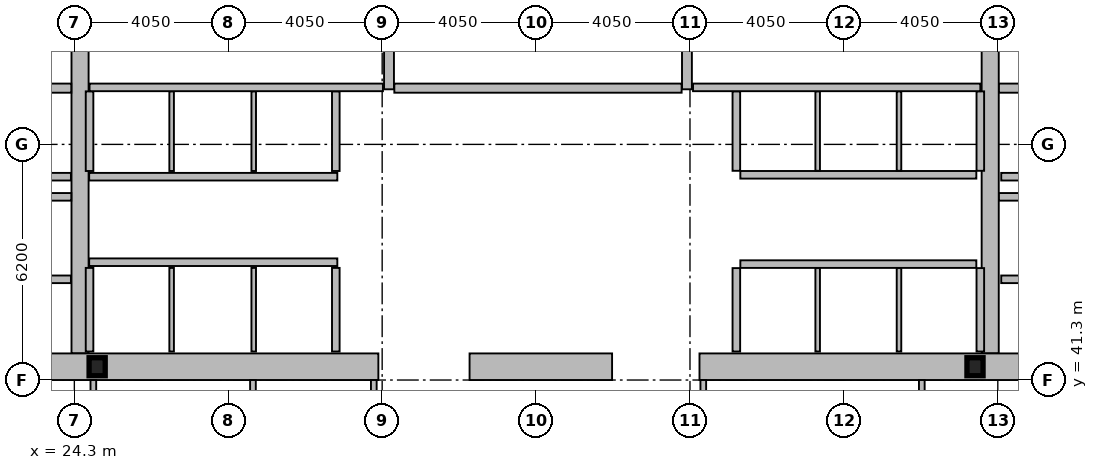
"""IFC4 building model, lengths in metres.
Left out: names, types, materials, properties, quantities, classifications, styles, units other than length and angle.
Written with IfcOpenShell. Run it as: python <this file> out.ifc"""

import sys

from ifc_helpers import new_model, si_unit, direction, frame, frame_2d, origin, origin_2d, place, context, subcontext, project, spatial, rectangle, i_section, extrude, element, fill, save


model = new_model("IFC4")
c1 = context("Model", 3, precision=1e-05, world=origin(), true_north=direction((0.0, 1.0)))
c2 = subcontext(c1, "Body", "Model", "MODEL_VIEW")
j1 = project(units=[si_unit("LENGTHUNIT", "METRE"), si_unit("PLANEANGLEUNIT", "RADIAN")], contexts=[c1])
p1 = place(None, origin())
s1 = spatial("IfcSite", under=j1, at=p1, CompositionType="ELEMENT")
p2 = place(p1, origin())
s2 = spatial("IfcBuilding", under=s1, at=p2, CompositionType="ELEMENT")
p3 = place(p2, frame((0.0, 0.0, 106.6)))
s3 = spatial("IfcBuildingStorey", under=s2, at=p3, CompositionType="ELEMENT", Elevation=106.6)
for number, where, z_axis, x_axis in (
    (1, (24.45, 42.0, 0.0), (0.0, 0.0, 1.0), (0.0, 1.0, 0.0)),
    (2, (48.4, 42.0, 0.0), (0.0, 0.0, 1.0), (0.0, 1.0, 0.0)),
):
    element("IfcWall", number, at=place(p3, frame(where, z_axis=z_axis, x_axis=x_axis)), inside=s3, PredefinedType="SHEAR", context=c2, shape_type="SweptSolid", body=[
        extrude(rectangle(XDim=11.0, YDim=0.45, at=frame_2d((5.5, 0.0))), origin(), (0.0, 0.0, 1.0), 4.24),
    ])
p4 = place(p3, frame((32.3, 41.65, 0.0), z_axis=(0.0, 0.0, 1.0), x_axis=(-1.0, 0.0, 0.0)))
e3 = element("IfcWall", 3, at=p4, inside=s3, PredefinedType="SHEAR", context=c2, shape_type="SweptSolid", body=[
    extrude(rectangle(XDim=11.45, YDim=0.7, at=frame_2d((5.725, 0.0))), origin(), (0.0, 0.0, 1.0), 4.24),
])
p5 = place(p3, frame((38.45, 41.65, 0.0), z_axis=(0.0, 0.0, 1.0), x_axis=(-1.0, 0.0, 0.0)))
e4 = element("IfcWall", 4, at=p5, inside=s3, PredefinedType="SHEAR", context=c2, shape_type="SweptSolid", body=[
    extrude(rectangle(XDim=3.75, YDim=0.7, at=frame_2d((1.875, 0.0))), origin(), (0.0, 0.0, 1.0), 4.24),
])
p6 = place(p3, frame((52.05, 41.65, 0.0), z_axis=(0.0, 0.0, 1.0), x_axis=(-1.0, 0.0, 0.0)))
e5 = element("IfcWall", 5, at=p6, inside=s3, PredefinedType="SHEAR", context=c2, shape_type="SweptSolid", body=[
    extrude(rectangle(XDim=11.3, YDim=0.7, at=frame_2d((5.65, 0.0))), origin(), (0.0, 0.0, 1.0), 4.24),
])
for number, where, z_axis, x_axis in (
    (6, (32.58, 48.95, 0.0), (0.0, 0.0, 1.0), (0.0, 1.0, 0.0)),
    (7, (40.42, 48.95, 0.0), (0.0, 0.0, 1.0), (0.0, 1.0, 0.0)),
):
    element("IfcWall", number, at=place(p3, frame(where, z_axis=z_axis, x_axis=x_axis)), inside=s3, PredefinedType="SHEAR", context=c2, shape_type="SweptSolid", body=[
        extrude(rectangle(XDim=4.05, YDim=0.26, at=frame_2d((2.025, 0.0))), origin(), (0.0, 0.0, 1.0), 4.24),
    ])
p7 = place(p3, frame((16.9, 48.98, 0.0), z_axis=(0.0, 0.0, 1.0), x_axis=(1.0, 0.0, 0.0)))
e8 = element("IfcWall", 8, at=p7, inside=s3, PredefinedType="SHEAR", context=c2, shape_type="SweptSolid", body=[
    extrude(rectangle(XDim=7.32, YDim=0.24, at=frame_2d((3.66, 0.0))), origin(), (0.0, 0.0, 1.0), 4.24),
])
p8 = place(p7, frame((0.22, 0.0, 0.0)))
e9 = element("IfcOpeningElement", 9, at=p8, cuts=e8, PredefinedType="OPENING", context=c2, shape_type="SweptSolid", body=[
    extrude(rectangle(XDim=1.05, YDim=2.15, at=frame_2d((0.525, 1.075))), frame((0.0, 0.13, 0.0), z_axis=(0.0, -1.0, 0.0), x_axis=(1.0, 0.0, 0.0)), (0.0, 0.0, 1.0), 0.26),
])
p9 = place(p3, frame((48.63, 48.98, 0.0), z_axis=(0.0, 0.0, 1.0), x_axis=(1.0, 0.0, 0.0)))
e10 = element("IfcWall", 10, at=p9, inside=s3, PredefinedType="SHEAR", context=c2, shape_type="SweptSolid", body=[
    extrude(rectangle(XDim=7.37, YDim=0.24, at=frame_2d((3.685, 0.0))), origin(), (0.0, 0.0, 1.0), 4.24),
])
p10 = place(p9, frame((6.1, 0.0, 0.0)))
e11 = element("IfcOpeningElement", 11, at=p10, cuts=e10, PredefinedType="OPENING", context=c2, shape_type="SweptSolid", body=[
    extrude(rectangle(XDim=1.05, YDim=2.15, at=frame_2d((0.525, 1.075))), frame((0.0, 0.13, 0.0), z_axis=(0.0, -1.0, 0.0), x_axis=(1.0, 0.0, 0.0)), (0.0, 0.0, 1.0), 0.26),
])
p11 = place(p3, frame((32.72, 48.98, 0.0), z_axis=(0.0, 0.0, 1.0), x_axis=(1.0, 0.0, 0.0)))
e12 = element("IfcWall", 12, at=p11, inside=s3, PredefinedType="SHEAR", context=c2, shape_type="SweptSolid", body=[
    extrude(rectangle(XDim=7.56, YDim=0.24, at=frame_2d((3.78, 0.0))), origin(), (0.0, 0.0, 1.0), 4.24),
])
p12 = place(p11, frame((0.22, 0.0, 0.0)))
e13 = element("IfcOpeningElement", 13, at=p12, cuts=e12, PredefinedType="OPENING", context=c2, shape_type="SweptSolid", body=[
    extrude(rectangle(XDim=1.05, YDim=2.15, at=frame_2d((0.525, 1.075))), frame((0.0, 0.13, 0.0), z_axis=(0.0, -1.0, 0.0), x_axis=(1.0, 0.0, 0.0)), (0.0, 0.0, 1.0), 0.26),
])
for number, where, z_axis, x_axis in (
    (14, (24.9, 41.65, 0.0), (0.0, 0.0, 1.0), (1.0, 0.0, 0.0)),
    (15, (48.0, 41.65, 0.0), (0.0, 0.0, 1.0), (1.0, 0.0, 0.0)),
):
    element("IfcColumn", number, at=place(p3, frame(where, z_axis=z_axis, x_axis=x_axis)), inside=s3, PredefinedType="COLUMN", context=c2, shape_type="SweptSolid", body=[
        extrude(i_section(OverallWidth=0.424, OverallDepth=0.474, WebThickness=0.048, FlangeThickness=0.077, at=origin_2d()), origin(), (0.0, 0.0, 1.0), 4.4),
    ])
p13 = place(p3, frame((24.69, 44.4, 0.0), z_axis=(0.0, 0.0, 1.0), x_axis=(1.0, 0.0, 0.0)))
e16 = element("IfcWall", 16, at=p13, inside=s3, PredefinedType="PARTITIONING", context=c2, shape_type="SweptSolid", body=[
    extrude(rectangle(XDim=6.53, YDim=0.2, at=frame_2d((3.265, 0.0))), origin(), (0.0, 0.0, 1.0), 4.24),
])
p14 = place(p13, frame((0.53, 0.0, 0.0)))
e17 = element("IfcOpeningElement", 17, at=p14, cuts=e16, PredefinedType="OPENING", context=c2, shape_type="SweptSolid", body=[
    extrude(rectangle(XDim=1.1, YDim=2.18, at=frame_2d((0.55, 1.09))), frame((0.0, 0.11, 0.0), z_axis=(0.0, -1.0, 0.0), x_axis=(1.0, 0.0, 0.0)), (0.0, 0.0, 1.0), 0.22),
])
p15 = place(p13, frame((2.69, 0.0, 0.0)))
e18 = element("IfcOpeningElement", 18, at=p15, cuts=e16, PredefinedType="OPENING", context=c2, shape_type="SweptSolid", body=[
    extrude(rectangle(XDim=1.1, YDim=2.18, at=frame_2d((0.55, 1.09))), frame((0.0, 0.11, 0.0), z_axis=(0.0, -1.0, 0.0), x_axis=(1.0, 0.0, 0.0)), (0.0, 0.0, 1.0), 0.22),
])
p16 = place(p13, frame((4.85, 0.0, 0.0)))
e19 = element("IfcOpeningElement", 19, at=p16, cuts=e16, PredefinedType="OPENING", context=c2, shape_type="SweptSolid", body=[
    extrude(rectangle(XDim=1.1, YDim=2.18, at=frame_2d((0.55, 1.09))), frame((0.0, 0.11, 0.0), z_axis=(0.0, -1.0, 0.0), x_axis=(1.0, 0.0, 0.0)), (0.0, 0.0, 1.0), 0.22),
])
p17 = place(p3, frame((51.61, 43.95, 0.0), z_axis=(0.0, 0.0, 1.0), x_axis=(-1.0, 0.0, 0.0)))
e20 = element("IfcWall", 20, at=p17, inside=s3, PredefinedType="PARTITIONING", context=c2, shape_type="SweptSolid", body=[
    extrude(rectangle(XDim=2.92, YDim=0.2, at=frame_2d((1.46, 0.0))), origin(), (0.0, 0.0, 1.0), 4.24),
])
p18 = place(p17, frame((0.81, 0.0, 0.0)))
e21 = element("IfcOpeningElement", 21, at=p18, cuts=e20, PredefinedType="OPENING", context=c2, shape_type="SweptSolid", body=[
    extrude(rectangle(XDim=1.3, YDim=2.18, at=frame_2d((0.65, 1.09))), frame((0.0, 0.11, 0.0), z_axis=(0.0, -1.0, 0.0), x_axis=(1.0, 0.0, 0.0)), (0.0, 0.0, 1.0), 0.22),
])
p19 = place(p3, frame((24.21, 43.95, 0.0), z_axis=(0.0, 0.0, 1.0), x_axis=(-1.0, 0.0, 0.0)))
e22 = element("IfcWall", 22, at=p19, inside=s3, PredefinedType="PARTITIONING", context=c2, shape_type="SweptSolid", body=[
    extrude(rectangle(XDim=2.97, YDim=0.2, at=frame_2d((1.485, 0.0))), origin(), (0.0, 0.0, 1.0), 4.24),
])
p20 = place(p19, frame((0.86, 0.0, 0.0)))
e23 = element("IfcOpeningElement", 23, at=p20, cuts=e22, PredefinedType="OPENING", context=c2, shape_type="SweptSolid", body=[
    extrude(rectangle(XDim=1.3, YDim=2.18, at=frame_2d((0.65, 1.09))), frame((0.0, 0.11, 0.0), z_axis=(0.0, -1.0, 0.0), x_axis=(1.0, 0.0, 0.0)), (0.0, 0.0, 1.0), 0.22),
])
p21 = place(p3, frame((51.61, 46.65, 0.0), z_axis=(0.0, 0.0, 1.0), x_axis=(-1.0, 0.0, 0.0)))
e24 = element("IfcWall", 24, at=p21, inside=s3, PredefinedType="PARTITIONING", context=c2, shape_type="SweptSolid", body=[
    extrude(rectangle(XDim=2.92, YDim=0.2, at=frame_2d((1.46, 0.0))), origin(), (0.0, 0.0, 1.0), 4.24),
])
p22 = place(p21, frame((0.86, 0.0, 0.0)))
e25 = element("IfcOpeningElement", 25, at=p22, cuts=e24, PredefinedType="OPENING", context=c2, shape_type="SweptSolid", body=[
    extrude(rectangle(XDim=1.2, YDim=2.18, at=frame_2d((0.6, 1.09))), frame((0.0, 0.11, 0.0), z_axis=(0.0, -1.0, 0.0), x_axis=(1.0, 0.0, 0.0)), (0.0, 0.0, 1.0), 0.22),
])
p23 = place(p3, frame((24.21, 46.65, 0.0), z_axis=(0.0, 0.0, 1.0), x_axis=(-1.0, 0.0, 0.0)))
e26 = element("IfcWall", 26, at=p23, inside=s3, PredefinedType="PARTITIONING", context=c2, shape_type="SweptSolid", body=[
    extrude(rectangle(XDim=2.97, YDim=0.2, at=frame_2d((1.485, 0.0))), origin(), (0.0, 0.0, 1.0), 4.24),
])
p24 = place(p23, frame((0.91, 0.0, 0.0)))
e27 = element("IfcOpeningElement", 27, at=p24, cuts=e26, PredefinedType="OPENING", context=c2, shape_type="SweptSolid", body=[
    extrude(rectangle(XDim=1.2, YDim=2.18, at=frame_2d((0.6, 1.09))), frame((0.0, 0.11, 0.0), z_axis=(0.0, -1.0, 0.0), x_axis=(1.0, 0.0, 0.0)), (0.0, 0.0, 1.0), 0.22),
])
p25 = place(p3, frame((31.22, 46.65, 0.0), z_axis=(0.0, 0.0, 1.0), x_axis=(-1.0, 0.0, 0.0)))
e28 = element("IfcWall", 28, at=p25, inside=s3, PredefinedType="PARTITIONING", context=c2, shape_type="SweptSolid", body=[
    extrude(rectangle(XDim=6.53, YDim=0.2, at=frame_2d((3.265, 0.0))), origin(), (0.0, 0.0, 1.0), 4.24),
])
p26 = place(p25, frame((4.9, 0.0, 0.0)))
e29 = element("IfcOpeningElement", 29, at=p26, cuts=e28, PredefinedType="OPENING", context=c2, shape_type="SweptSolid", body=[
    extrude(rectangle(XDim=1.1, YDim=2.18, at=frame_2d((0.55, 1.09))), frame((0.0, 0.11, 0.0), z_axis=(0.0, -1.0, 0.0), x_axis=(1.0, 0.0, 0.0)), (0.0, 0.0, 1.0), 0.22),
])
p27 = place(p25, frame((2.74, 0.0, 0.0)))
e30 = element("IfcOpeningElement", 30, at=p27, cuts=e28, PredefinedType="OPENING", context=c2, shape_type="SweptSolid", body=[
    extrude(rectangle(XDim=1.1, YDim=2.18, at=frame_2d((0.55, 1.09))), frame((0.0, 0.11, 0.0), z_axis=(0.0, -1.0, 0.0), x_axis=(1.0, 0.0, 0.0)), (0.0, 0.0, 1.0), 0.22),
])
p28 = place(p25, frame((0.58, 0.0, 0.0)))
e31 = element("IfcOpeningElement", 31, at=p28, cuts=e28, PredefinedType="OPENING", context=c2, shape_type="SweptSolid", body=[
    extrude(rectangle(XDim=1.1, YDim=2.18, at=frame_2d((0.55, 1.09))), frame((0.0, 0.11, 0.0), z_axis=(0.0, -1.0, 0.0), x_axis=(1.0, 0.0, 0.0)), (0.0, 0.0, 1.0), 0.22),
])
p29 = place(p3, frame((21.2, 46.12, 0.0), z_axis=(0.0, 0.0, 1.0), x_axis=(1.0, 0.0, 0.0)))
e32 = element("IfcWall", 32, at=p29, inside=s3, PredefinedType="PARTITIONING", context=c2, shape_type="SweptSolid", body=[
    extrude(rectangle(XDim=3.02, YDim=0.2, at=frame_2d((1.51, 0.0))), origin(), (0.0, 0.0, 1.0), 4.24),
])
p30 = place(p3, frame((48.63, 46.12, 0.0), z_axis=(0.0, 0.0, 1.0), x_axis=(1.0, 0.0, 0.0)))
e33 = element("IfcWall", 33, at=p30, inside=s3, PredefinedType="PARTITIONING", context=c2, shape_type="SweptSolid", body=[
    extrude(rectangle(XDim=3.07, YDim=0.2, at=frame_2d((1.535, 0.0))), origin(), (0.0, 0.0, 1.0), 4.24),
])
for number, where, z_axis, x_axis in (
    (34, (24.7, 46.8, 0.0), (0.0, 0.0, 1.0), (0.0, 1.0, 0.0)),
    (35, (31.18, 46.8, 0.0), (0.0, 0.0, 1.0), (0.0, 1.0, 0.0)),
):
    element("IfcWall", number, at=place(p3, frame(where, z_axis=z_axis, x_axis=x_axis)), inside=s3, PredefinedType="PARTITIONING", context=c2, shape_type="SweptSolid", body=[
        extrude(rectangle(XDim=2.095, YDim=0.2, at=frame_2d((1.047, 0.0))), origin(), (0.0, 0.0, 1.0), 4.24),
    ])
for number, where, z_axis, x_axis in (
    (36, (26.86, 46.8, 0.0), (0.0, 0.0, 1.0), (0.0, 1.0, 0.0)),
    (37, (29.02, 46.8, 0.0), (0.0, 0.0, 1.0), (0.0, 1.0, 0.0)),
):
    element("IfcWall", number, at=place(p3, frame(where, z_axis=z_axis, x_axis=x_axis)), inside=s3, PredefinedType="PARTITIONING", context=c2, shape_type="SweptSolid", body=[
        extrude(rectangle(XDim=2.095, YDim=0.12, at=frame_2d((1.047, 0.0))), origin(), (0.0, 0.0, 1.0), 4.24),
    ])
for number, where, z_axis, x_axis in (
    (38, (24.7, 42.05, 0.0), (0.0, 0.0, 1.0), (0.0, 1.0, 0.0)),
    (39, (31.18, 42.05, 0.0), (0.0, 0.0, 1.0), (0.0, 1.0, 0.0)),
):
    element("IfcWall", number, at=place(p3, frame(where, z_axis=z_axis, x_axis=x_axis)), inside=s3, PredefinedType="PARTITIONING", context=c2, shape_type="SweptSolid", body=[
        extrude(rectangle(XDim=2.2, YDim=0.2, at=frame_2d((1.1, 0.0))), origin(), (0.0, 0.0, 1.0), 4.24),
    ])
for number, where, z_axis, x_axis in (
    (40, (26.86, 42.05, 0.0), (0.0, 0.0, 1.0), (0.0, 1.0, 0.0)),
    (41, (29.02, 42.05, 0.0), (0.0, 0.0, 1.0), (0.0, 1.0, 0.0)),
):
    element("IfcWall", number, at=place(p3, frame(where, z_axis=z_axis, x_axis=x_axis)), inside=s3, PredefinedType="PARTITIONING", context=c2, shape_type="SweptSolid", body=[
        extrude(rectangle(XDim=2.2, YDim=0.12, at=frame_2d((1.1, 0.0))), origin(), (0.0, 0.0, 1.0), 4.24),
    ])
p31 = place(p3, frame((41.825, 46.7, 0.0), z_axis=(0.0, 0.0, 1.0), x_axis=(1.0, 0.0, 0.0)))
e42 = element("IfcWall", 42, at=p31, inside=s3, PredefinedType="PARTITIONING", context=c2, shape_type="SweptSolid", body=[
    extrude(rectangle(XDim=6.21, YDim=0.2, at=frame_2d((3.105, 0.0))), origin(), (0.0, 0.0, 1.0), 4.24),
])
for number, where, z_axis, x_axis in (
    (43, (41.72, 46.805, 0.0), (0.0, 0.0, 1.0), (0.0, 1.0, 0.0)),
    (44, (48.14, 46.805, 0.0), (0.0, 0.0, 1.0), (0.0, 1.0, 0.0)),
):
    element("IfcWall", number, at=place(p3, frame(where, z_axis=z_axis, x_axis=x_axis)), inside=s3, PredefinedType="PARTITIONING", context=c2, shape_type="SweptSolid", body=[
        extrude(rectangle(XDim=2.09, YDim=0.2, at=frame_2d((1.045, 0.0))), origin(), (0.0, 0.0, 1.0), 4.24),
    ])
for number, where, z_axis, x_axis in (
    (45, (43.86, 46.805, 0.0), (0.0, 0.0, 1.0), (0.0, 1.0, 0.0)),
    (46, (46.0, 46.805, 0.0), (0.0, 0.0, 1.0), (0.0, 1.0, 0.0)),
):
    element("IfcWall", number, at=place(p3, frame(where, z_axis=z_axis, x_axis=x_axis)), inside=s3, PredefinedType="PARTITIONING", context=c2, shape_type="SweptSolid", body=[
        extrude(rectangle(XDim=2.09, YDim=0.12, at=frame_2d((1.045, 0.0))), origin(), (0.0, 0.0, 1.0), 4.24),
    ])
p32 = place(p3, frame((41.825, 44.35, 0.0), z_axis=(0.0, 0.0, 1.0), x_axis=(1.0, 0.0, 0.0)))
e47 = element("IfcWall", 47, at=p32, inside=s3, PredefinedType="PARTITIONING", context=c2, shape_type="SweptSolid", body=[
    extrude(rectangle(XDim=6.21, YDim=0.2, at=frame_2d((3.105, 0.0))), origin(), (0.0, 0.0, 1.0), 4.24),
])
for number, where, z_axis, x_axis in (
    (48, (41.72, 42.05, 0.0), (0.0, 0.0, 1.0), (0.0, 1.0, 0.0)),
    (49, (48.14, 42.05, 0.0), (0.0, 0.0, 1.0), (0.0, 1.0, 0.0)),
):
    element("IfcWall", number, at=place(p3, frame(where, z_axis=z_axis, x_axis=x_axis)), inside=s3, PredefinedType="PARTITIONING", context=c2, shape_type="SweptSolid", body=[
        extrude(rectangle(XDim=2.195, YDim=0.2, at=frame_2d((1.098, 0.0))), origin(), (0.0, 0.0, 1.0), 4.24),
    ])
for number, where, z_axis, x_axis in (
    (50, (43.86, 42.05, 0.0), (0.0, 0.0, 1.0), (0.0, 1.0, 0.0)),
    (51, (46.0, 42.05, 0.0), (0.0, 0.0, 1.0), (0.0, 1.0, 0.0)),
):
    element("IfcWall", number, at=place(p3, frame(where, z_axis=z_axis, x_axis=x_axis)), inside=s3, PredefinedType="PARTITIONING", context=c2, shape_type="SweptSolid", body=[
        extrude(rectangle(XDim=2.195, YDim=0.12, at=frame_2d((1.098, 0.0))), origin(), (0.0, 0.0, 1.0), 4.24),
    ])
p33 = place(p3, frame((24.7, 49.0, 0.0), z_axis=(0.0, 0.0, 1.0), x_axis=(1.0, 0.0, 0.0)))
e52 = element("IfcWall", 52, at=p33, inside=s3, PredefinedType="PARTITIONING", context=c2, shape_type="SweptSolid", body=[
    extrude(rectangle(XDim=7.72, YDim=0.2, at=frame_2d((3.86, 0.0))), origin(), (0.0, 0.0, 1.0), 4.24),
])
p34 = place(p33, frame((6.56, 0.0, 0.0)))
e53 = element("IfcOpeningElement", 53, at=p34, cuts=e52, PredefinedType="OPENING", context=c2, shape_type="SweptSolid", body=[
    extrude(rectangle(XDim=0.95, YDim=2.1, at=frame_2d((0.475, 1.05))), frame((0.0, 0.11, 0.0), z_axis=(0.0, -1.0, 0.0), x_axis=(1.0, 0.0, 0.0)), (0.0, 0.0, 1.0), 0.22),
])
p35 = place(p3, frame((40.58, 49.0, 0.0), z_axis=(0.0, 0.0, 1.0), x_axis=(1.0, 0.0, 0.0)))
e54 = element("IfcWall", 54, at=p35, inside=s3, PredefinedType="PARTITIONING", context=c2, shape_type="SweptSolid", body=[
    extrude(rectangle(XDim=7.56, YDim=0.2, at=frame_2d((3.78, 0.0))), origin(), (0.0, 0.0, 1.0), 4.24),
])
p36 = place(p35, frame((0.16, 0.0, 0.0)))
e55 = element("IfcOpeningElement", 55, at=p36, cuts=e54, PredefinedType="OPENING", context=c2, shape_type="SweptSolid", body=[
    extrude(rectangle(XDim=0.95, YDim=2.1, at=frame_2d((0.475, 1.05))), frame((0.0, 0.11, 0.0), z_axis=(0.0, -1.0, 0.0), x_axis=(1.0, 0.0, 0.0)), (0.0, 0.0, 1.0), 0.22),
])
p37 = place(p3, frame((24.8, 38.28, 0.0), z_axis=(0.0, 0.0, 1.0), x_axis=(0.0, 1.0, 0.0)))
e56 = element("IfcWall", 56, at=p37, inside=s3, PredefinedType="PARTITIONING", context=c2, shape_type="SweptSolid", body=[
    extrude(rectangle(XDim=3.02, YDim=0.15, at=frame_2d((1.51, 0.0))), origin(), (0.0, 0.0, 1.0), 3.53),
])
for number, where, z_axis, x_axis in (
    (57, (29.0, 38.28, 0.0), (0.0, 0.0, 1.0), (0.0, 1.0, 0.0)),
    (58, (32.18, 38.28, 0.0), (0.0, 0.0, 1.0), (0.0, 1.0, 0.0)),
):
    element("IfcWall", number, at=place(p3, frame(where, z_axis=z_axis, x_axis=x_axis)), inside=s3, PredefinedType="PARTITIONING", context=c2, shape_type="SweptSolid", body=[
        extrude(rectangle(XDim=3.02, YDim=0.15, at=frame_2d((1.51, 0.0))), origin(), (0.0, 0.0, 1.0), 4.24),
    ])
for number, where, z_axis, x_axis in (
    (59, (40.85, 38.2, 0.0), (0.0, 0.0, 1.0), (0.0, 1.0, 0.0)),
    (60, (46.6, 38.2, 0.0), (0.0, 0.0, 1.0), (0.0, 1.0, 0.0)),
):
    element("IfcWall", number, at=place(p3, frame(where, z_axis=z_axis, x_axis=x_axis)), inside=s3, PredefinedType="PARTITIONING", context=c2, shape_type="SweptSolid", body=[
        extrude(rectangle(XDim=3.1, YDim=0.15, at=frame_2d((1.55, 0.0))), origin(), (0.0, 0.0, 1.0), 4.24),
    ])
p38 = place(p12, origin())
e61 = element("IfcDoor", 61, at=p38, inside=s3, OperationType="SINGLE_SWING_LEFT", PredefinedType="DOOR", context=c2, shape_type="SweptSolid", body=[
    extrude(rectangle(XDim=1.05, YDim=2.15, at=frame_2d((0.525, 1.075))), frame((0.0, 0.025, 0.0), z_axis=(0.0, -1.0, 0.0), x_axis=(1.0, 0.0, 0.0)), (0.0, 0.0, 1.0), 0.05),
])
fill(e13, e61)
p39 = place(p14, origin())
e62 = element("IfcDoor", 62, at=p39, inside=s3, OperationType="SLIDING_TO_LEFT", PredefinedType="DOOR", context=c2, shape_type="SweptSolid", body=[
    extrude(rectangle(XDim=1.1, YDim=2.18, at=frame_2d((0.55, 1.09))), frame((0.0, 0.025, 0.0), z_axis=(0.0, -1.0, 0.0), x_axis=(1.0, 0.0, 0.0)), (0.0, 0.0, 1.0), 0.05),
])
fill(e17, e62)
p40 = place(p15, origin())
e63 = element("IfcDoor", 63, at=p40, inside=s3, OperationType="SLIDING_TO_LEFT", PredefinedType="DOOR", context=c2, shape_type="SweptSolid", body=[
    extrude(rectangle(XDim=1.1, YDim=2.18, at=frame_2d((0.55, 1.09))), frame((0.0, 0.025, 0.0), z_axis=(0.0, -1.0, 0.0), x_axis=(1.0, 0.0, 0.0)), (0.0, 0.0, 1.0), 0.05),
])
fill(e18, e63)
p41 = place(p16, origin())
e64 = element("IfcDoor", 64, at=p41, inside=s3, OperationType="SLIDING_TO_LEFT", PredefinedType="DOOR", context=c2, shape_type="SweptSolid", body=[
    extrude(rectangle(XDim=1.1, YDim=2.18, at=frame_2d((0.55, 1.09))), frame((0.0, 0.025, 0.0), z_axis=(0.0, -1.0, 0.0), x_axis=(1.0, 0.0, 0.0)), (0.0, 0.0, 1.0), 0.05),
])
fill(e19, e64)
p42 = place(p26, origin())
e65 = element("IfcDoor", 65, at=p42, inside=s3, OperationType="SLIDING_TO_LEFT", PredefinedType="DOOR", context=c2, shape_type="SweptSolid", body=[
    extrude(rectangle(XDim=1.1, YDim=2.18, at=frame_2d((0.55, 1.09))), frame((0.0, 0.025, 0.0), z_axis=(0.0, -1.0, 0.0), x_axis=(1.0, 0.0, 0.0)), (0.0, 0.0, 1.0), 0.05),
])
fill(e29, e65)
p43 = place(p27, origin())
e66 = element("IfcDoor", 66, at=p43, inside=s3, OperationType="SLIDING_TO_LEFT", PredefinedType="DOOR", context=c2, shape_type="SweptSolid", body=[
    extrude(rectangle(XDim=1.1, YDim=2.18, at=frame_2d((0.55, 1.09))), frame((0.0, 0.025, 0.0), z_axis=(0.0, -1.0, 0.0), x_axis=(1.0, 0.0, 0.0)), (0.0, 0.0, 1.0), 0.05),
])
fill(e30, e66)
p44 = place(p28, origin())
e67 = element("IfcDoor", 67, at=p44, inside=s3, OperationType="SLIDING_TO_LEFT", PredefinedType="DOOR", context=c2, shape_type="SweptSolid", body=[
    extrude(rectangle(XDim=1.1, YDim=2.18, at=frame_2d((0.55, 1.09))), frame((0.0, 0.025, 0.0), z_axis=(0.0, -1.0, 0.0), x_axis=(1.0, 0.0, 0.0)), (0.0, 0.0, 1.0), 0.05),
])
fill(e31, e67)
p45 = place(p34, origin())
e68 = element("IfcDoor", 68, at=p45, inside=s3, OperationType="SINGLE_SWING_RIGHT", PredefinedType="DOOR", context=c2, shape_type="SweptSolid", body=[
    extrude(rectangle(XDim=0.95, YDim=2.1, at=frame_2d((0.475, 1.05))), frame((0.0, 0.025, 0.0), z_axis=(0.0, -1.0, 0.0), x_axis=(1.0, 0.0, 0.0)), (0.0, 0.0, 1.0), 0.05),
])
fill(e53, e68)
p46 = place(p36, origin())
e69 = element("IfcDoor", 69, at=p46, inside=s3, OperationType="SINGLE_SWING_LEFT", PredefinedType="DOOR", context=c2, shape_type="SweptSolid", body=[
    extrude(rectangle(XDim=0.95, YDim=2.1, at=frame_2d((0.475, 1.05))), frame((0.0, 0.025, 0.0), z_axis=(0.0, -1.0, 0.0), x_axis=(1.0, 0.0, 0.0)), (0.0, 0.0, 1.0), 0.05),
])
fill(e55, e69)
save(model, sys.argv[1])
